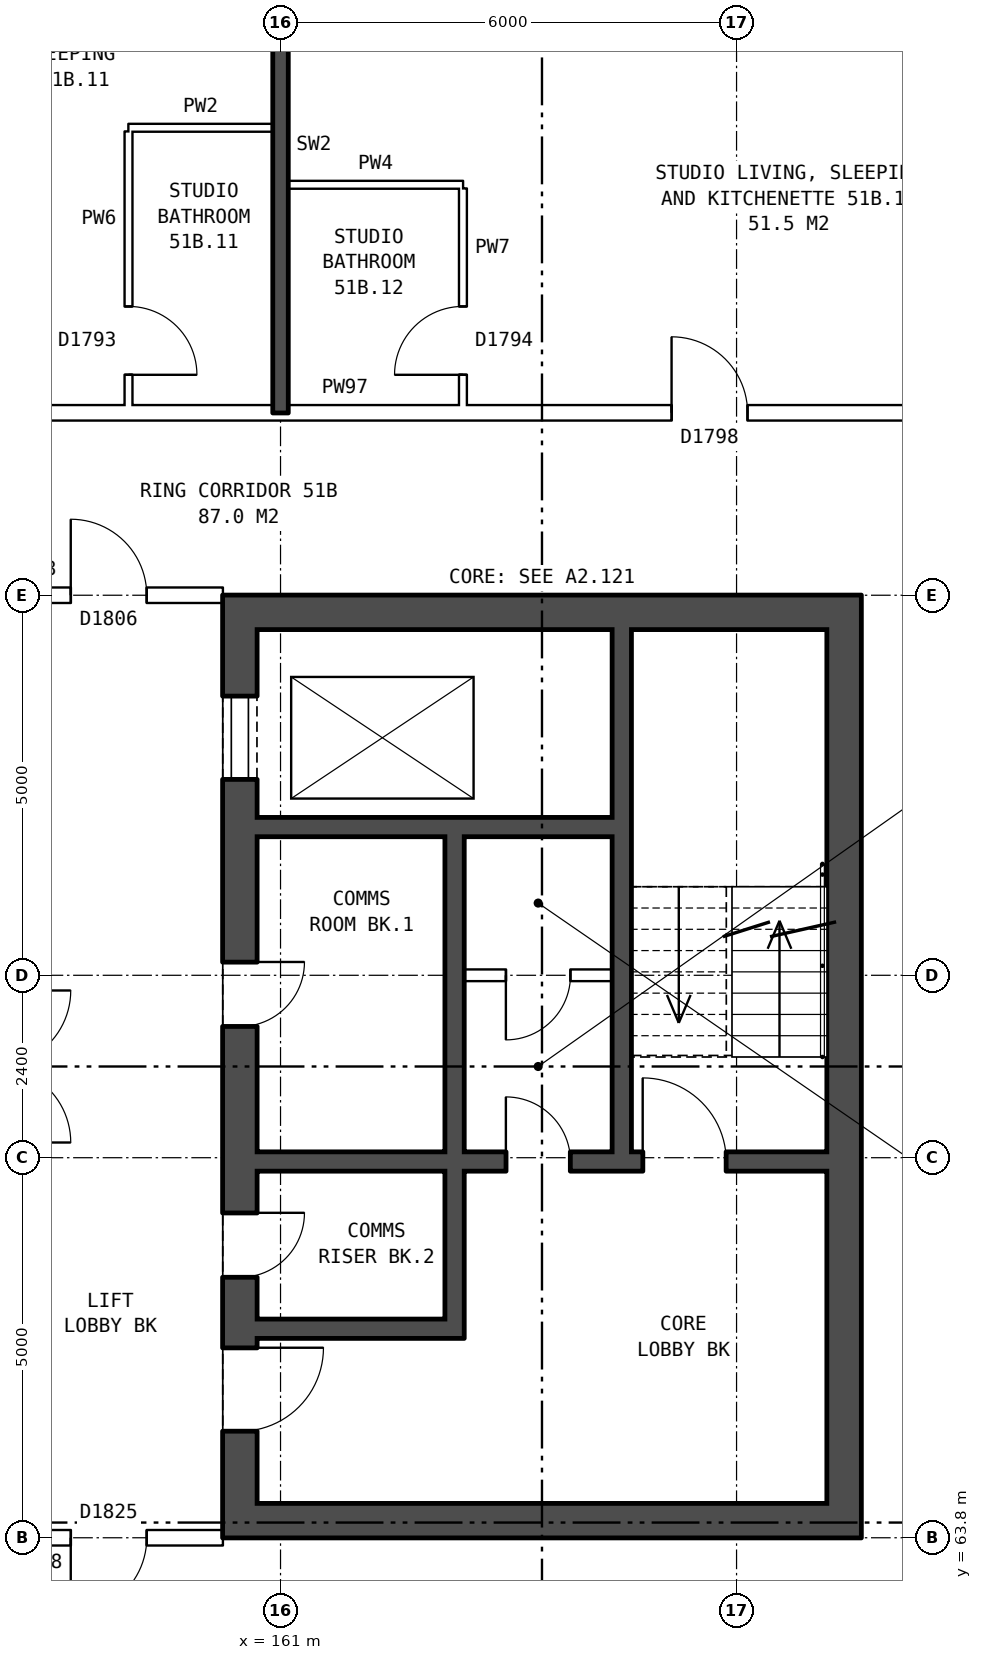
"""IFC4 building model, lengths in metres.
Left out: names, types, materials, properties, quantities, classifications, styles, units other than length and angle.
Written with IfcOpenShell. Run it as: python <this file> out.ifc"""

import sys

from ifc_helpers import new_model, si_unit, direction, frame, frame_2d, origin, place, context, subcontext, project, spatial, rectangle, extrude, element, fill, save


model = new_model("IFC4")
c1 = context("Model", 3, precision=1e-05, world=origin(), true_north=direction((0.0, 1.0)))
c2 = subcontext(c1, "Body", "Model", "MODEL_VIEW")
j1 = project(units=[si_unit("LENGTHUNIT", "METRE"), si_unit("PLANEANGLEUNIT", "RADIAN")], contexts=[c1])
p1 = place(None, origin())
s1 = spatial("IfcSite", under=j1, at=p1, CompositionType="ELEMENT")
p2 = place(p1, origin())
s2 = spatial("IfcBuilding", under=s1, at=p2, CompositionType="ELEMENT")
p3 = place(p2, frame((0.0, 0.0, 182.0)))
s3 = spatial("IfcBuildingStorey", under=s2, at=p3, CompositionType="ELEMENT", Elevation=182.0)
p4 = place(p3, frame((170.07, 82.925, 0.0), z_axis=(0.0, 0.0, 1.0), x_axis=(-0.707106781187, 0.707106781187, 0.0)))
e1 = element("IfcWall", 1, at=p4, inside=s3, PredefinedType="STANDARD", context=c2, shape_type="SweptSolid", body=[
    extrude(rectangle(XDim=4.094, YDim=0.36, at=frame_2d((2.047, 0.0))), origin(), (0.0, 0.0, 1.0), 2.85),
])
p5 = place(p4, frame((1.247, 0.0, 0.8)))
e2 = element("IfcOpeningElement", 2, at=p5, cuts=e1, PredefinedType="OPENING", context=c2, shape_type="SweptSolid", body=[
    extrude(rectangle(XDim=1.6, YDim=1.8, at=frame_2d((0.8, 0.9))), frame((0.0, 0.19, 0.0), z_axis=(0.0, -1.0, 0.0), x_axis=(1.0, 0.0, 0.0)), (0.0, 0.0, 1.0), 0.38),
])
p6 = place(p3, frame((160.465, 76.2, 0.0), z_axis=(0.0, 0.0, 1.0), x_axis=(0.0, -1.0, 0.0)))
e3 = element("IfcWall", 3, at=p6, inside=s3, PredefinedType="SHEAR", context=c2, shape_type="SweptSolid", body=[
    extrude(rectangle(XDim=12.4, YDim=0.45, at=frame_2d((6.2, 0.0))), origin(), (0.0, 0.0, 1.0), 2.85),
])
p7 = place(p6, frame((1.325, 0.0, 0.0)))
e4 = element("IfcOpeningElement", 4, at=p7, cuts=e3, PredefinedType="OPENING", context=c2, shape_type="SweptSolid", body=[
    extrude(rectangle(XDim=1.1, YDim=2.1, at=frame_2d((0.55, 1.05))), frame((0.0, 0.235, 0.0), z_axis=(0.0, -1.0, 0.0), x_axis=(1.0, 0.0, 0.0)), (0.0, 0.0, 1.0), 0.47),
])
p8 = place(p6, frame((4.825, 0.0, 0.0)))
e5 = element("IfcOpeningElement", 5, at=p8, cuts=e3, PredefinedType="OPENING", context=c2, shape_type="SweptSolid", body=[
    extrude(rectangle(XDim=0.85, YDim=2.1, at=frame_2d((0.425, 1.05))), frame((0.0, 0.235, 0.0), z_axis=(0.0, -1.0, 0.0), x_axis=(1.0, 0.0, 0.0)), (0.0, 0.0, 1.0), 0.47),
])
p9 = place(p6, frame((9.9, 0.0, 0.0)))
e6 = element("IfcOpeningElement", 6, at=p9, cuts=e3, PredefinedType="OPENING", context=c2, shape_type="SweptSolid", body=[
    extrude(rectangle(XDim=1.1, YDim=2.1, at=frame_2d((0.55, 1.05))), frame((0.0, 0.235, 0.0), z_axis=(0.0, -1.0, 0.0), x_axis=(1.0, 0.0, 0.0)), (0.0, 0.0, 1.0), 0.47),
])
p10 = place(p6, frame((8.125, 0.0, 0.0)))
e7 = element("IfcOpeningElement", 7, at=p10, cuts=e3, PredefinedType="OPENING", context=c2, shape_type="SweptSolid", body=[
    extrude(rectangle(XDim=0.85, YDim=2.1, at=frame_2d((0.425, 1.05))), frame((0.0, 0.235, 0.0), z_axis=(0.0, -1.0, 0.0), x_axis=(1.0, 0.0, 0.0)), (0.0, 0.0, 1.0), 0.47),
])
p11 = place(p3, frame((168.415, 76.2, 0.0), z_axis=(0.0, 0.0, 1.0), x_axis=(0.0, -1.0, 0.0)))
e8 = element("IfcWall", 8, at=p11, inside=s3, PredefinedType="SHEAR", context=c2, shape_type="SweptSolid", body=[
    extrude(rectangle(XDim=12.4, YDim=0.45, at=frame_2d((6.2, 0.0))), origin(), (0.0, 0.0, 1.0), 2.85),
])
for number, where, z_axis, x_axis in (
    (9, (160.69, 75.975, 0.0), (0.0, 0.0, 1.0), (1.0, 0.0, 0.0)),
    (10, (160.69, 64.025, 0.0), (0.0, 0.0, 1.0), (1.0, 0.0, 0.0)),
):
    element("IfcWall", number, at=place(p3, frame(where, z_axis=z_axis, x_axis=x_axis)), inside=s3, PredefinedType="SHEAR", context=c2, shape_type="SweptSolid", body=[
        extrude(rectangle(XDim=7.5, YDim=0.45, at=frame_2d((3.75, 0.0))), origin(), (0.0, 0.0, 1.0), 2.85),
    ])
p12 = place(p3, frame((160.69, 73.15, 0.0), z_axis=(0.0, 0.0, 1.0), x_axis=(1.0, 0.0, 0.0)))
e11 = element("IfcWall", 11, at=p12, inside=s3, PredefinedType="SHEAR", context=c2, shape_type="SweptSolid", body=[
    extrude(rectangle(XDim=4.675, YDim=0.25, at=frame_2d((2.337, 0.0))), origin(), (0.0, 0.0, 1.0), 2.85),
])
p13 = place(p3, frame((163.415, 71.2, 0.0), z_axis=(0.0, 0.0, 1.0), x_axis=(1.0, 0.0, 0.0)))
e12 = element("IfcWall", 12, at=p13, inside=s3, PredefinedType="PARTITIONING", context=c2, shape_type="SweptSolid", body=[
    extrude(rectangle(XDim=1.95, YDim=0.15, at=frame_2d((0.975, 0.0))), origin(), (0.0, 0.0, 1.0), 2.85),
])
p14 = place(p13, frame((0.55, 0.0, 0.0)))
e13 = element("IfcOpeningElement", 13, at=p14, cuts=e12, PredefinedType="OPENING", context=c2, shape_type="SweptSolid", body=[
    extrude(rectangle(XDim=0.85, YDim=2.1, at=frame_2d((0.425, 1.05))), frame((0.0, 0.085, 0.0), z_axis=(0.0, -1.0, 0.0), x_axis=(1.0, 0.0, 0.0)), (0.0, 0.0, 1.0), 0.17),
])
p15 = place(p3, frame((160.69, 68.75, 0.0), z_axis=(0.0, 0.0, 1.0), x_axis=(1.0, 0.0, 0.0)))
e14 = element("IfcWall", 14, at=p15, inside=s3, PredefinedType="SHEAR", context=c2, shape_type="SweptSolid", body=[
    extrude(rectangle(XDim=7.5, YDim=0.25, at=frame_2d((3.75, 0.0))), origin(), (0.0, 0.0, 1.0), 2.85),
])
p16 = place(p15, frame((5.075, 0.0, 0.0)))
e15 = element("IfcOpeningElement", 15, at=p16, cuts=e14, PredefinedType="OPENING", context=c2, shape_type="SweptSolid", body=[
    extrude(rectangle(XDim=1.1, YDim=2.1, at=frame_2d((0.55, 1.05))), frame((0.0, 0.135, 0.0), z_axis=(0.0, -1.0, 0.0), x_axis=(1.0, 0.0, 0.0)), (0.0, 0.0, 1.0), 0.27),
])
p17 = place(p15, frame((3.275, 0.0, 0.0)))
e16 = element("IfcOpeningElement", 16, at=p17, cuts=e14, PredefinedType="OPENING", context=c2, shape_type="SweptSolid", body=[
    extrude(rectangle(XDim=0.85, YDim=2.1, at=frame_2d((0.425, 1.05))), frame((0.0, 0.135, 0.0), z_axis=(0.0, -1.0, 0.0), x_axis=(1.0, 0.0, 0.0)), (0.0, 0.0, 1.0), 0.27),
])
p18 = place(p3, frame((160.69, 66.55, 0.0), z_axis=(0.0, 0.0, 1.0), x_axis=(1.0, 0.0, 0.0)))
e17 = element("IfcWall", 17, at=p18, inside=s3, PredefinedType="SHEAR", context=c2, shape_type="SweptSolid", body=[
    extrude(rectangle(XDim=2.475, YDim=0.25, at=frame_2d((1.238, 0.0))), origin(), (0.0, 0.0, 1.0), 2.85),
])
p19 = place(p3, frame((163.29, 73.025, 0.0), z_axis=(0.0, 0.0, 1.0), x_axis=(0.0, -1.0, 0.0)))
e18 = element("IfcWall", 18, at=p19, inside=s3, PredefinedType="SHEAR", context=c2, shape_type="SweptSolid", body=[
    extrude(rectangle(XDim=4.15, YDim=0.25, at=frame_2d((2.075, 0.0))), origin(), (0.0, 0.0, 1.0), 2.85),
])
p20 = place(p3, frame((163.29, 68.625, 0.0), z_axis=(0.0, 0.0, 1.0), x_axis=(0.0, -1.0, 0.0)))
e19 = element("IfcWall", 19, at=p20, inside=s3, PredefinedType="SHEAR", context=c2, shape_type="SweptSolid", body=[
    extrude(rectangle(XDim=2.2, YDim=0.25, at=frame_2d((1.1, 0.0))), origin(), (0.0, 0.0, 1.0), 2.85),
])
p21 = place(p3, frame((165.49, 75.75, 0.0), z_axis=(0.0, 0.0, 1.0), x_axis=(0.0, -1.0, 0.0)))
e20 = element("IfcWall", 20, at=p21, inside=s3, PredefinedType="SHEAR", context=c2, shape_type="SweptSolid", body=[
    extrude(rectangle(XDim=6.875, YDim=0.25, at=frame_2d((3.438, 0.0))), origin(), (0.0, 0.0, 1.0), 2.85),
])
p22 = place(p3, frame((157.24, 63.8, 0.0), z_axis=(0.0, 0.0, 1.0), x_axis=(1.0, 0.0, 0.0)))
e21 = element("IfcWall", 21, at=p22, inside=s3, PredefinedType="PARTITIONING", context=c2, shape_type="SweptSolid", body=[
    extrude(rectangle(XDim=3.0, YDim=0.2, at=frame_2d((1.5, 0.0))), origin(), (0.0, 0.0, 1.0), 2.85),
])
p23 = place(p22, frame((1.0, 0.0, 0.0)))
e22 = element("IfcOpeningElement", 22, at=p23, cuts=e21, PredefinedType="OPENING", context=c2, shape_type="SweptSolid", body=[
    extrude(rectangle(XDim=1.0, YDim=2.1, at=frame_2d((0.5, 1.05))), frame((0.0, 0.11, 0.0), z_axis=(0.0, -1.0, 0.0), x_axis=(1.0, 0.0, 0.0)), (0.0, 0.0, 1.0), 0.22),
])
p24 = place(p3, frame((157.24, 76.2, 0.0), z_axis=(0.0, 0.0, 1.0), x_axis=(1.0, 0.0, 0.0)))
e23 = element("IfcWall", 23, at=p24, inside=s3, PredefinedType="PARTITIONING", context=c2, shape_type="SweptSolid", body=[
    extrude(rectangle(XDim=3.0, YDim=0.2, at=frame_2d((1.5, 0.0))), origin(), (0.0, 0.0, 1.0), 2.85),
])
p25 = place(p24, frame((1.0, 0.0, 0.0)))
e24 = element("IfcOpeningElement", 24, at=p25, cuts=e23, PredefinedType="OPENING", context=c2, shape_type="SweptSolid", body=[
    extrude(rectangle(XDim=1.0, YDim=2.1, at=frame_2d((0.5, 1.05))), frame((0.0, 0.11, 0.0), z_axis=(0.0, -1.0, 0.0), x_axis=(1.0, 0.0, 0.0)), (0.0, 0.0, 1.0), 0.22),
])
p26 = place(p3, frame((155.1, 78.6, 0.0), z_axis=(0.0, 0.0, 1.0), x_axis=(1.0, 0.0, 0.0)))
e25 = element("IfcWall", 25, at=p26, inside=s3, PredefinedType="PARTITIONING", context=c2, shape_type="SweptSolid", body=[
    extrude(rectangle(XDim=14.79, YDim=0.2, at=frame_2d((7.395, 0.0))), origin(), (0.0, 0.0, 1.0), 2.85),
])
p27 = place(p26, frame((1.45, 0.0, 0.0)))
e26 = element("IfcOpeningElement", 26, at=p27, cuts=e25, PredefinedType="OPENING", context=c2, shape_type="SweptSolid", body=[
    extrude(rectangle(XDim=1.0, YDim=2.1, at=frame_2d((0.5, 1.05))), frame((0.0, 0.11, 0.0), z_axis=(0.0, -1.0, 0.0), x_axis=(1.0, 0.0, 0.0)), (0.0, 0.0, 1.0), 0.22),
])
p28 = place(p26, frame((11.045, 0.0, 0.0)))
e27 = element("IfcOpeningElement", 27, at=p28, cuts=e25, PredefinedType="OPENING", context=c2, shape_type="SweptSolid", body=[
    extrude(rectangle(XDim=1.0, YDim=2.1, at=frame_2d((0.5, 1.05))), frame((0.0, 0.11, 0.0), z_axis=(0.0, -1.0, 0.0), x_axis=(1.0, 0.0, 0.0)), (0.0, 0.0, 1.0), 0.22),
])
p29 = place(p3, frame((161.1, 81.6, 0.0), z_axis=(0.0, 0.0, 1.0), x_axis=(1.0, 0.0, 0.0)))
e28 = element("IfcWall", 28, at=p29, inside=s3, PredefinedType="PARTITIONING", context=c2, shape_type="SweptSolid", body=[
    extrude(rectangle(XDim=2.3, YDim=0.1, at=frame_2d((1.15, 0.0))), origin(), (0.0, 0.0, 1.0), 2.85),
])
p30 = place(p3, frame((159.0, 82.35, 0.0), z_axis=(0.0, 0.0, 1.0), x_axis=(1.0, 0.0, 0.0)))
e29 = element("IfcWall", 29, at=p30, inside=s3, PredefinedType="PARTITIONING", context=c2, shape_type="SweptSolid", body=[
    extrude(rectangle(XDim=1.9, YDim=0.1, at=frame_2d((0.95, 0.0))), origin(), (0.0, 0.0, 1.0), 2.85),
])
p31 = place(p3, frame((159.0, 78.7, 0.0), z_axis=(0.0, 0.0, 1.0), x_axis=(0.0, 1.0, 0.0)))
e30 = element("IfcWall", 30, at=p31, inside=s3, PredefinedType="PARTITIONING", context=c2, shape_type="SweptSolid", body=[
    extrude(rectangle(XDim=3.6, YDim=0.1, at=frame_2d((1.8, 0.0))), origin(), (0.0, 0.0, 1.0), 2.85),
])
p32 = place(p31, frame((0.4, 0.0, 0.0)))
e31 = element("IfcOpeningElement", 31, at=p32, cuts=e30, PredefinedType="OPENING", context=c2, shape_type="SweptSolid", body=[
    extrude(rectangle(XDim=0.9, YDim=2.1, at=frame_2d((0.45, 1.05))), frame((0.0, 0.06, 0.0), z_axis=(0.0, -1.0, 0.0), x_axis=(1.0, 0.0, 0.0)), (0.0, 0.0, 1.0), 0.12),
])
p33 = place(p3, frame((161.0, 78.6, 0.0), z_axis=(0.0, 0.0, 1.0), x_axis=(0.0, 1.0, 0.0)))
e32 = element("IfcWall", 32, at=p33, inside=s3, PredefinedType="SOLIDWALL", context=c2, shape_type="SweptSolid", body=[
    extrude(rectangle(XDim=7.04, YDim=0.2, at=frame_2d((3.52, 0.0))), origin(), (0.0, 0.0, 1.0), 2.85),
])
p34 = place(p3, frame((163.4, 78.7, 0.0), z_axis=(0.0, 0.0, 1.0), x_axis=(0.0, 1.0, 0.0)))
e33 = element("IfcWall", 33, at=p34, inside=s3, PredefinedType="PARTITIONING", context=c2, shape_type="SweptSolid", body=[
    extrude(rectangle(XDim=2.85, YDim=0.1, at=frame_2d((1.425, 0.0))), origin(), (0.0, 0.0, 1.0), 2.85),
])
p35 = place(p34, frame((0.4, 0.0, 0.0)))
e34 = element("IfcOpeningElement", 34, at=p35, cuts=e33, PredefinedType="OPENING", context=c2, shape_type="SweptSolid", body=[
    extrude(rectangle(XDim=0.9, YDim=2.1, at=frame_2d((0.45, 1.05))), frame((0.0, 0.06, 0.0), z_axis=(0.0, -1.0, 0.0), x_axis=(1.0, 0.0, 0.0)), (0.0, 0.0, 1.0), 0.12),
])
p36 = place(p7, origin())
e35 = element("IfcDoor", 35, at=p36, inside=s3, OperationType="DOUBLE_DOOR_SLIDING", PredefinedType="DOOR", context=c2, shape_type="SweptSolid", body=[
    extrude(rectangle(XDim=1.1, YDim=2.1, at=frame_2d((0.55, 1.05))), frame((0.0, 0.21, 0.0), z_axis=(0.0, -1.0, 0.0), x_axis=(1.0, 0.0, 0.0)), (0.0, 0.0, 1.0), 0.05),
])
fill(e4, e35)
p37 = place(p8, origin())
e36 = element("IfcDoor", 36, at=p37, inside=s3, OperationType="SINGLE_SWING_LEFT", PredefinedType="DOOR", context=c2, shape_type="SweptSolid", body=[
    extrude(rectangle(XDim=0.85, YDim=2.1, at=frame_2d((0.425, 1.05))), frame((0.0, 0.21, 0.0), z_axis=(0.0, -1.0, 0.0), x_axis=(1.0, 0.0, 0.0)), (0.0, 0.0, 1.0), 0.05),
])
fill(e5, e36)
p38 = place(p9, origin())
e37 = element("IfcDoor", 37, at=p38, inside=s3, OperationType="SINGLE_SWING_LEFT", PredefinedType="DOOR", context=c2, shape_type="SweptSolid", body=[
    extrude(rectangle(XDim=1.1, YDim=2.1, at=frame_2d((0.55, 1.05))), frame((0.0, 0.21, 0.0), z_axis=(0.0, -1.0, 0.0), x_axis=(1.0, 0.0, 0.0)), (0.0, 0.0, 1.0), 0.05),
])
fill(e6, e37)
p39 = place(p16, origin())
e38 = element("IfcDoor", 38, at=p39, inside=s3, OperationType="SINGLE_SWING_LEFT", PredefinedType="DOOR", context=c2, shape_type="SweptSolid", body=[
    extrude(rectangle(XDim=1.1, YDim=2.1, at=frame_2d((0.55, 1.05))), frame((0.0, 0.025, 0.0), z_axis=(0.0, -1.0, 0.0), x_axis=(1.0, 0.0, 0.0)), (0.0, 0.0, 1.0), 0.05),
])
fill(e15, e38)
p40 = place(p10, origin())
e39 = element("IfcDoor", 39, at=p40, inside=s3, OperationType="SINGLE_SWING_LEFT", PredefinedType="DOOR", context=c2, shape_type="SweptSolid", body=[
    extrude(rectangle(XDim=0.85, YDim=2.1, at=frame_2d((0.425, 1.05))), frame((0.0, 0.21, 0.0), z_axis=(0.0, -1.0, 0.0), x_axis=(1.0, 0.0, 0.0)), (0.0, 0.0, 1.0), 0.05),
])
fill(e7, e39)
p41 = place(p17, origin())
e40 = element("IfcDoor", 40, at=p41, inside=s3, OperationType="SINGLE_SWING_LEFT", PredefinedType="DOOR", context=c2, shape_type="SweptSolid", body=[
    extrude(rectangle(XDim=0.85, YDim=2.1, at=frame_2d((0.425, 1.05))), frame((0.0, 0.025, 0.0), z_axis=(0.0, -1.0, 0.0), x_axis=(1.0, 0.0, 0.0)), (0.0, 0.0, 1.0), 0.05),
])
fill(e16, e40)
p42 = place(p14, frame((0.85, 0.0, 0.0), z_axis=(0.0, 0.0, 1.0), x_axis=(-1.0, 0.0, 0.0)))
e41 = element("IfcDoor", 41, at=p42, inside=s3, OperationType="SINGLE_SWING_RIGHT", PredefinedType="DOOR", context=c2, shape_type="SweptSolid", body=[
    extrude(rectangle(XDim=0.85, YDim=2.1, at=frame_2d((0.425, 1.05))), frame((0.0, 0.025, 0.0), z_axis=(0.0, -1.0, 0.0), x_axis=(1.0, 0.0, 0.0)), (0.0, 0.0, 1.0), 0.05),
])
fill(e13, e41)
p43 = place(p23, frame((1.0, 0.0, 0.0), z_axis=(0.0, 0.0, 1.0), x_axis=(-1.0, 0.0, 0.0)))
e42 = element("IfcDoor", 42, at=p43, inside=s3, OperationType="SINGLE_SWING_RIGHT", PredefinedType="DOOR", context=c2, shape_type="SweptSolid", body=[
    extrude(rectangle(XDim=1.0, YDim=2.1, at=frame_2d((0.5, 1.05))), frame((0.0, 0.025, 0.0), z_axis=(0.0, -1.0, 0.0), x_axis=(1.0, 0.0, 0.0)), (0.0, 0.0, 1.0), 0.05),
])
fill(e22, e42)
p44 = place(p25, origin())
e43 = element("IfcDoor", 43, at=p44, inside=s3, OperationType="SINGLE_SWING_LEFT", PredefinedType="DOOR", context=c2, shape_type="SweptSolid", body=[
    extrude(rectangle(XDim=1.0, YDim=2.1, at=frame_2d((0.5, 1.05))), frame((0.0, 0.025, 0.0), z_axis=(0.0, -1.0, 0.0), x_axis=(1.0, 0.0, 0.0)), (0.0, 0.0, 1.0), 0.05),
])
fill(e24, e43)
p45 = place(p32, frame((0.9, 0.0, 0.0), z_axis=(0.0, 0.0, 1.0), x_axis=(-1.0, 0.0, 0.0)))
e44 = element("IfcDoor", 44, at=p45, inside=s3, OperationType="SINGLE_SWING_RIGHT", PredefinedType="DOOR", context=c2, shape_type="SweptSolid", body=[
    extrude(rectangle(XDim=0.9, YDim=2.1, at=frame_2d((0.45, 1.05))), frame((0.0, 0.025, 0.0), z_axis=(0.0, -1.0, 0.0), x_axis=(1.0, 0.0, 0.0)), (0.0, 0.0, 1.0), 0.05),
])
fill(e31, e44)
p46 = place(p28, origin())
e45 = element("IfcDoor", 45, at=p46, inside=s3, OperationType="SINGLE_SWING_LEFT", PredefinedType="DOOR", context=c2, shape_type="SweptSolid", body=[
    extrude(rectangle(XDim=1.0, YDim=2.1, at=frame_2d((0.5, 1.05))), frame((0.0, 0.025, 0.0), z_axis=(0.0, -1.0, 0.0), x_axis=(1.0, 0.0, 0.0)), (0.0, 0.0, 1.0), 0.05),
])
fill(e27, e45)
p47 = place(p35, origin())
e46 = element("IfcDoor", 46, at=p47, inside=s3, OperationType="SINGLE_SWING_LEFT", PredefinedType="DOOR", context=c2, shape_type="SweptSolid", body=[
    extrude(rectangle(XDim=0.9, YDim=2.1, at=frame_2d((0.45, 1.05))), frame((0.0, 0.025, 0.0), z_axis=(0.0, -1.0, 0.0), x_axis=(1.0, 0.0, 0.0)), (0.0, 0.0, 1.0), 0.05),
])
fill(e34, e46)
save(model, sys.argv[1])
